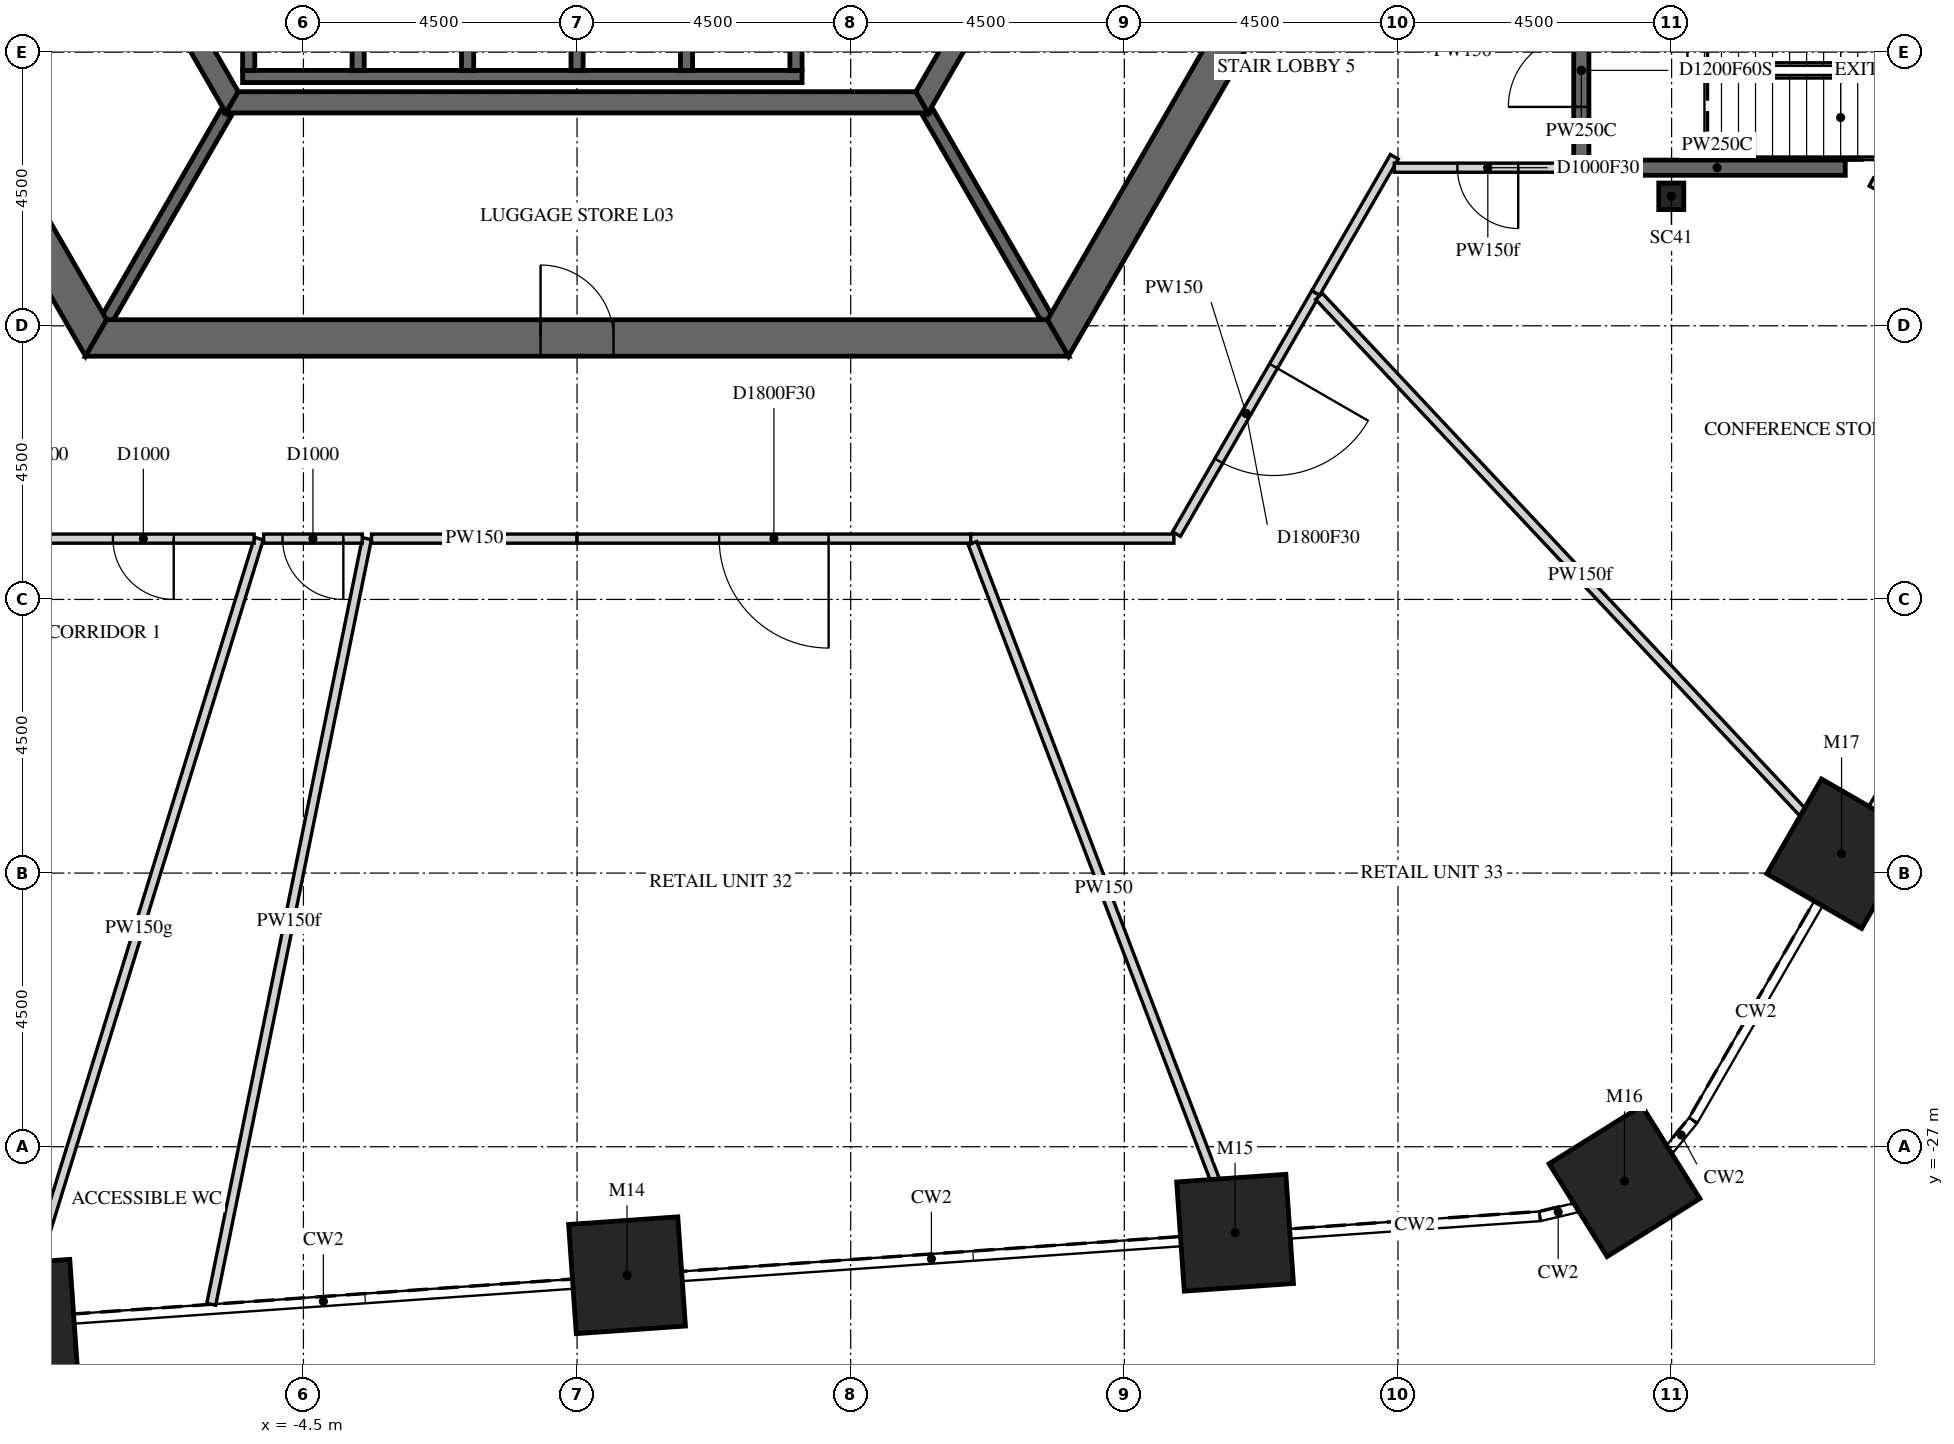
"""IFC4 building model, lengths in metres.
Left out: names, types, materials, properties, quantities, classifications, styles, units other than length and angle.
Written with IfcOpenShell. Run it as: python <this file> out.ifc"""

import sys

from ifc_helpers import new_model, si_unit, direction, frame, frame_2d, origin, origin_2d, place, context, subcontext, project, spatial, polyline, rectangle, i_section, outline, extrude, element, fill, save


model = new_model("IFC4")
c1 = context("Model", 3, precision=1e-05, world=origin(), true_north=direction((0.0, 1.0)))
c2 = subcontext(c1, "Body", "Model", "MODEL_VIEW")
j1 = project(units=[si_unit("LENGTHUNIT", "METRE"), si_unit("PLANEANGLEUNIT", "RADIAN")], contexts=[c1])
p1 = place(None, origin())
s1 = spatial("IfcSite", under=j1, at=p1, CompositionType="ELEMENT")
p2 = place(p1, origin())
s2 = spatial("IfcBuilding", under=s1, at=p2, CompositionType="ELEMENT")
p3 = place(p2, frame((0.0, 0.0, 20.5)))
s3 = spatial("IfcBuildingStorey", under=s2, at=p3, CompositionType="ELEMENT", Elevation=20.5)
for number, where, z_axis, x_axis in (
    (1, (-9.177, -29.813, -0.25), (0.0, 0.0, 1.0), (-0.998, -0.07, 0.0)),
    (2, (0.822, -29.114, -0.25), (0.0, 0.0, 1.0), (-0.998, -0.07, 0.0)),
    (3, (10.821, -28.414, -0.25), (0.0, 0.0, 1.0), (-0.998, -0.07, 0.0)),
    (4, (17.225, -27.566, -0.25), (0.0, 0.0, 1.0), (-0.848, -0.53, 0.0)),
    (5, (20.795, -22.182, -0.25), (0.0, 0.0, 1.0), (-0.5, -0.866, 0.0)),
):
    element("IfcColumn", number, at=place(p3, frame(where, z_axis=z_axis, x_axis=x_axis)), inside=s3, PredefinedType="COLUMN", context=c2, shape_type="SweptSolid", body=[
        extrude(rectangle(XDim=1.8, YDim=1.8, at=origin_2d()), origin(), (0.0, 0.0, 1.0), 5.5),
    ])
p4 = place(p3, frame((17.995, -11.37, -0.25), z_axis=(0.0, 0.0, 1.0), x_axis=(1.0, 0.0, 0.0)))
e6 = element("IfcColumn", 6, at=p4, inside=s3, PredefinedType="COLUMN", context=c2, shape_type="SweptSolid", body=[
    extrude(i_section(OverallWidth=0.412, OverallDepth=0.437, WebThickness=0.036, FlangeThickness=0.058, FilletRadius=0.015, at=origin_2d()), origin(), (0.0, 0.0, 1.0), 5.5),
])
p5 = place(p3, frame((-15.819, 0.0, -0.25), z_axis=(0.0, 0.0, 1.0), x_axis=(0.499999880136, -0.866025472988, 0.0)))
e7 = element("IfcWall", 7, at=p5, inside=s3, PredefinedType="SHEAR", context=c2, shape_type="SweptSolid", body=[
    extrude(outline(polyline([(-0.173, -0.3), (15.993, -0.3), (15.646, 0.3), (0.173, 0.3), (-0.173, -0.3)])), origin(), (0.0, 0.0, 1.0), 5.5),
])
p6 = place(p5, frame((6.981, 0.0, 0.25)))
e8 = element("IfcOpeningElement", 8, at=p6, cuts=e7, PredefinedType="OPENING", context=c2, shape_type="SweptSolid", body=[
    extrude(rectangle(XDim=1.8, YDim=2.4, at=frame_2d((0.9, 1.2))), frame((0.0, 0.31, 0.0), z_axis=(0.0, -1.0, 0.0), x_axis=(1.0, 0.0, 0.0)), (0.0, 0.0, 1.0), 0.62),
])
p7 = place(p3, frame((-7.91, -13.7, -0.25), z_axis=(0.0, 0.0, 1.0), x_axis=(1.0, 0.0, 0.0)))
e9 = element("IfcWall", 9, at=p7, inside=s3, PredefinedType="SHEAR", context=c2, shape_type="SweptSolid", body=[
    extrude(outline(polyline([(-0.173, -0.3), (15.993, -0.3), (15.646, 0.3), (0.173, 0.3), (-0.173, -0.3)])), origin(), (0.0, 0.0, 1.0), 5.5),
])
p8 = place(p7, frame((7.31, 0.0, 0.25)))
e10 = element("IfcOpeningElement", 10, at=p8, cuts=e9, PredefinedType="OPENING", context=c2, shape_type="SweptSolid", body=[
    extrude(rectangle(XDim=1.2, YDim=2.4, at=frame_2d((0.6, 1.2))), frame((0.0, 0.31, 0.0), z_axis=(0.0, -1.0, 0.0), x_axis=(1.0, 0.0, 0.0)), (0.0, 0.0, 1.0), 0.62),
])
p9 = place(p3, frame((7.91, -13.7, -0.25), z_axis=(0.0, 0.0, 1.0), x_axis=(0.499999880136, 0.866025472988, 0.0)))
e11 = element("IfcWall", 11, at=p9, inside=s3, PredefinedType="SHEAR", context=c2, shape_type="SweptSolid", body=[
    extrude(outline(polyline([(-0.173, -0.3), (15.993, -0.3), (15.646, 0.3), (0.173, 0.3), (-0.173, -0.3)])), origin(), (0.0, 0.0, 1.0), 5.5),
])
p10 = place(p9, frame((7.039, 0.0, 0.25)))
e12 = element("IfcOpeningElement", 12, at=p10, cuts=e11, PredefinedType="OPENING", context=c2, shape_type="SweptSolid", body=[
    extrude(rectangle(XDim=1.8, YDim=2.4, at=frame_2d((0.9, 1.2))), frame((0.0, 0.31, 0.0), z_axis=(0.0, -1.0, 0.0), x_axis=(1.0, 0.0, 0.0)), (0.0, 0.0, 1.0), 0.62),
])
p11 = place(p3, frame((-11.345, 0.0, -0.25), z_axis=(0.0, 0.0, 1.0), x_axis=(0.499995046907, -0.866028263435, 0.0)))
e13 = element("IfcWall", 13, at=p11, inside=s3, PredefinedType="SHEAR", context=c2, shape_type="SweptSolid", body=[
    extrude(outline(polyline([(-0.101, -0.175), (11.446, -0.175), (11.244, 0.175), (0.101, 0.175), (-0.101, -0.175)])), origin(), (0.0, 0.0, 1.0), 5.5),
])
p12 = place(p11, frame((4.744, 0.0, 0.25)))
e14 = element("IfcOpeningElement", 14, at=p12, cuts=e13, PredefinedType="OPENING", context=c2, shape_type="SweptSolid", body=[
    extrude(rectangle(XDim=1.8, YDim=2.4, at=frame_2d((0.9, 1.2))), frame((0.0, 0.185, 0.0), z_axis=(0.0, -1.0, 0.0), x_axis=(1.0, 0.0, 0.0)), (0.0, 0.0, 1.0), 0.37),
])
p13 = place(p3, frame((-5.673, -9.825, -0.25), z_axis=(0.0, 0.0, 1.0), x_axis=(1.0, 0.0, 0.0)))
e15 = element("IfcWall", 15, at=p13, inside=s3, PredefinedType="SHEAR", context=c2, shape_type="SweptSolid", body=[
    extrude(outline(polyline([(-0.101, -0.175), (11.446, -0.175), (11.244, 0.175), (0.101, 0.175), (-0.101, -0.175)])), origin(), (0.0, 0.0, 1.0), 5.5),
])
p14 = place(p3, frame((5.673, -9.825, -0.25), z_axis=(0.0, 0.0, 1.0), x_axis=(0.499995046907, 0.866028263435, 0.0)))
e16 = element("IfcWall", 16, at=p14, inside=s3, PredefinedType="SHEAR", context=c2, shape_type="SweptSolid", body=[
    extrude(outline(polyline([(-0.101, -0.175), (11.446, -0.175), (11.244, 0.175), (0.101, 0.175), (-0.101, -0.175)])), origin(), (0.0, 0.0, 1.0), 5.5),
])
p15 = place(p14, frame((4.801, 0.0, 0.25)))
e17 = element("IfcOpeningElement", 17, at=p15, cuts=e16, PredefinedType="OPENING", context=c2, shape_type="SweptSolid", body=[
    extrude(rectangle(XDim=1.8, YDim=2.4, at=frame_2d((0.9, 1.2))), frame((0.0, 0.185, 0.0), z_axis=(0.0, -1.0, 0.0), x_axis=(1.0, 0.0, 0.0)), (0.0, 0.0, 1.0), 0.37),
])
p16 = place(p3, frame((-5.5, -9.4, -0.25), z_axis=(0.0, 0.0, 1.0), x_axis=(1.0, 0.0, 0.0)))
e18 = element("IfcWall", 18, at=p16, inside=s3, PredefinedType="SHEAR", context=c2, shape_type="SweptSolid", body=[
    extrude(rectangle(XDim=9.2, YDim=0.2, at=frame_2d((4.6, 0.0))), origin(), (0.0, 0.0, 1.0), 5.5),
])
for number, where, z_axis, x_axis in (
    (19, (-5.4, -9.3, -0.25), (0.0, 0.0, 1.0), (0.0, 1.0, 0.0)),
    (20, (-3.6, -9.3, -0.25), (0.0, 0.0, 1.0), (0.0, 1.0, 0.0)),
    (21, (-1.8, -9.3, -0.25), (0.0, 0.0, 1.0), (0.0, 1.0, 0.0)),
    (22, (0.0, -9.3, -0.25), (0.0, 0.0, 1.0), (0.0, 1.0, 0.0)),
    (23, (1.8, -9.3, -0.25), (0.0, 0.0, 1.0), (0.0, 1.0, 0.0)),
    (24, (3.6, -9.3, -0.25), (0.0, 0.0, 1.0), (0.0, 1.0, 0.0)),
):
    element("IfcWall", number, at=place(p3, frame(where, z_axis=z_axis, x_axis=x_axis)), inside=s3, PredefinedType="SHEAR", context=c2, shape_type="SweptSolid", body=[
        extrude(rectangle(XDim=2.9, YDim=0.2, at=frame_2d((1.45, 0.0))), origin(), (0.0, 0.0, 1.0), 5.5),
    ])
for number, where, z_axis, x_axis in (
    (25, (-5.773, -10.0, -0.25), (0.0, 0.0, 1.0), (-0.5, -0.866, 0.0)),
    (26, (5.773, -10.0, -0.25), (0.0, 0.0, 1.0), (0.5, -0.866, 0.0)),
):
    element("IfcWall", number, at=place(p3, frame(where, z_axis=z_axis, x_axis=x_axis)), inside=s3, PredefinedType="SHEAR", context=c2, shape_type="SweptSolid", body=[
        extrude(rectangle(XDim=3.926, YDim=0.2, at=frame_2d((1.963, 0.0))), origin(), (0.0, 0.0, 1.0), 5.5),
    ])
p17 = place(p3, frame((-9.177, -29.813, 0.0), z_axis=(0.0, 0.0, 1.0), x_axis=(0.29419717946, 0.955744746048, 0.0)))
e27 = element("IfcWall", 27, at=p17, inside=s3, PredefinedType="PARTITIONING", context=c2, shape_type="SweptSolid", body=[
    extrude(rectangle(XDim=13.406, YDim=0.15, at=frame_2d((6.703, 0.0))), origin(), (0.0, 0.0, 1.0), 4.488),
])
p18 = place(p3, frame((-5.312, -17.0, 0.0), z_axis=(0.0, 0.0, 1.0), x_axis=(-1.0, 0.0, 0.0)))
e28 = element("IfcWall", 28, at=p18, inside=s3, PredefinedType="PARTITIONING", context=c2, shape_type="SweptSolid", body=[
    extrude(rectangle(XDim=3.643, YDim=0.15, at=frame_2d((1.821, 0.0))), origin(), (0.0, 0.0, 1.0), 5.25),
])
p19 = place(p18, frame((1.321, 0.0, 0.0)))
e29 = element("IfcOpeningElement", 29, at=p19, cuts=e28, PredefinedType="OPENING", context=c2, shape_type="SweptSolid", body=[
    extrude(rectangle(XDim=1.0, YDim=2.1, at=frame_2d((0.5, 1.05))), frame((0.0, 0.085, 0.0), z_axis=(0.0, -1.0, 0.0), x_axis=(1.0, 0.0, 0.0)), (0.0, 0.0, 1.0), 0.17),
])
p20 = place(p3, frame((-6.016, -29.592, 0.0), z_axis=(0.0, 0.0, 1.0), x_axis=(0.199231841521, 0.979952383192, 0.0)))
e30 = element("IfcWall", 30, at=p20, inside=s3, PredefinedType="PARTITIONING", context=c2, shape_type="SweptSolid", body=[
    extrude(rectangle(XDim=12.85, YDim=0.15, at=frame_2d((6.425, 0.0))), origin(), (0.0, 0.0, 1.0), 4.496),
])
p21 = place(p3, frame((-3.532, -17.0, 0.0), z_axis=(0.0, 0.0, 1.0), x_axis=(-1.0, 0.0, 0.0)))
e31 = element("IfcWall", 31, at=p21, inside=s3, PredefinedType="PARTITIONING", context=c2, shape_type="SweptSolid", body=[
    extrude(rectangle(XDim=1.622, YDim=0.15, at=frame_2d((0.811, 0.0))), origin(), (0.0, 0.0, 1.0), 5.25),
])
p22 = place(p21, frame((0.311, 0.0, 0.0)))
e32 = element("IfcOpeningElement", 32, at=p22, cuts=e31, PredefinedType="OPENING", context=c2, shape_type="SweptSolid", body=[
    extrude(rectangle(XDim=1.0, YDim=2.1, at=frame_2d((0.5, 1.05))), frame((0.0, 0.085, 0.0), z_axis=(0.0, -1.0, 0.0), x_axis=(1.0, 0.0, 0.0)), (0.0, 0.0, 1.0), 0.17),
])
p23 = place(p3, frame((-3.379, -17.0, 0.0), z_axis=(0.0, 0.0, 1.0), x_axis=(1.0, 0.0, 0.0)))
e33 = element("IfcWall", 33, at=p23, inside=s3, PredefinedType="PARTITIONING", context=c2, shape_type="SweptSolid", body=[
    extrude(rectangle(XDim=3.379, YDim=0.15, at=frame_2d((1.69, 0.0))), origin(), (0.0, 0.0, 1.0), 5.25),
])
p24 = place(p3, frame((6.474, -17.0, 0.0), z_axis=(0.0, 0.0, 1.0), x_axis=(-1.0, 0.0, 0.0)))
e34 = element("IfcWall", 34, at=p24, inside=s3, PredefinedType="PARTITIONING", context=c2, shape_type="SweptSolid", body=[
    extrude(rectangle(XDim=6.474, YDim=0.15, at=frame_2d((3.237, 0.0))), origin(), (0.0, 0.0, 1.0), 5.25),
])
p25 = place(p24, frame((2.337, 0.0, 0.0)))
e35 = element("IfcOpeningElement", 35, at=p25, cuts=e34, PredefinedType="OPENING", context=c2, shape_type="SweptSolid", body=[
    extrude(rectangle(XDim=1.8, YDim=2.1, at=frame_2d((0.9, 1.05))), frame((0.0, 0.085, 0.0), z_axis=(0.0, -1.0, 0.0), x_axis=(1.0, 0.0, 0.0)), (0.0, 0.0, 1.0), 0.17),
])
p26 = place(p3, frame((6.474, -17.0, 0.0), z_axis=(0.0, 0.0, 1.0), x_axis=(1.0, 0.0, 0.0)))
e36 = element("IfcWall", 36, at=p26, inside=s3, PredefinedType="PARTITIONING", context=c2, shape_type="SweptSolid", body=[
    extrude(rectangle(XDim=3.341, YDim=0.15, at=frame_2d((1.67, 0.0))), origin(), (0.0, 0.0, 1.0), 5.25),
])
p27 = place(p3, frame((12.148, -12.959, 0.0), z_axis=(0.0, 0.0, 1.0), x_axis=(-0.499957811549, -0.866049759928, 0.0)))
e37 = element("IfcWall", 37, at=p27, inside=s3, PredefinedType="PARTITIONING", context=c2, shape_type="SweptSolid", body=[
    extrude(rectangle(XDim=4.58, YDim=0.15, at=frame_2d((2.29, 0.0))), origin(), (0.0, 0.0, 1.0), 5.25),
])
p28 = place(p27, frame((1.39, 0.0, 0.0)))
e38 = element("IfcOpeningElement", 38, at=p28, cuts=e37, PredefinedType="OPENING", context=c2, shape_type="SweptSolid", body=[
    extrude(rectangle(XDim=1.8, YDim=2.1, at=frame_2d((0.9, 1.05))), frame((0.0, 0.085, 0.0), z_axis=(0.0, -1.0, 0.0), x_axis=(1.0, 0.0, 0.0)), (0.0, 0.0, 1.0), 0.17),
])
p29 = place(p3, frame((10.821, -28.414, 0.0), z_axis=(0.0, 0.0, 1.0), x_axis=(-0.355901613379, 0.934523430201, 0.0)))
e39 = element("IfcWall", 39, at=p29, inside=s3, PredefinedType="PARTITIONING", context=c2, shape_type="SweptSolid", body=[
    extrude(rectangle(XDim=12.134, YDim=0.15, at=frame_2d((6.067, 0.0))), origin(), (0.0, 0.0, 1.0), 5.25),
])
p30 = place(p3, frame((12.148, -12.959, 0.0), z_axis=(0.0, 0.0, 1.0), x_axis=(0.499959617396, 0.866048717436, 0.0)))
e40 = element("IfcWall", 40, at=p30, inside=s3, PredefinedType="PARTITIONING", context=c2, shape_type="SweptSolid", body=[
    extrude(rectangle(XDim=2.584, YDim=0.15, at=frame_2d((1.292, 0.0))), origin(), (0.0, 0.0, 1.0), 5.25),
])
p31 = place(p3, frame((16.515, -10.9, 0.0), z_axis=(0.0, 0.0, 1.0), x_axis=(-1.0, 0.0, 0.0)))
e41 = element("IfcWall", 41, at=p31, inside=s3, PredefinedType="PARTITIONING", context=c2, shape_type="SweptSolid", body=[
    extrude(rectangle(XDim=3.075, YDim=0.15, at=frame_2d((1.538, 0.0))), origin(), (0.0, 0.0, 1.0), 4.496),
])
p32 = place(p31, frame((1.038, 0.0, 0.0)))
e42 = element("IfcOpeningElement", 42, at=p32, cuts=e41, PredefinedType="OPENING", context=c2, shape_type="SweptSolid", body=[
    extrude(rectangle(XDim=1.0, YDim=2.1, at=frame_2d((0.5, 1.05))), frame((0.0, 0.085, 0.0), z_axis=(0.0, -1.0, 0.0), x_axis=(1.0, 0.0, 0.0)), (0.0, 0.0, 1.0), 0.17),
])
p33 = place(p3, frame((16.515, -10.825, 0.0), z_axis=(0.0, 0.0, 1.0), x_axis=(0.0, 1.0, 0.0)))
e43 = element("IfcWall", 43, at=p33, inside=s3, PredefinedType="PARTITIONING", context=c2, shape_type="SweptSolid", body=[
    extrude(rectangle(XDim=3.05, YDim=0.25, at=frame_2d((1.525, 0.0))), origin(), (0.0, 0.0, 1.0), 5.25),
])
p34 = place(p33, frame((0.925, 0.0, 0.0)))
e44 = element("IfcOpeningElement", 44, at=p34, cuts=e43, PredefinedType="OPENING", context=c2, shape_type="SweptSolid", body=[
    extrude(rectangle(XDim=1.2, YDim=2.1, at=frame_2d((0.6, 1.05))), frame((0.0, 0.135, 0.0), z_axis=(0.0, -1.0, 0.0), x_axis=(1.0, 0.0, 0.0)), (0.0, 0.0, 1.0), 0.27),
])
p35 = place(p3, frame((20.795, -22.182, 0.0), z_axis=(0.0, 0.0, 1.0), x_axis=(-0.683955995382, 0.729523266511, 0.0)))
e45 = element("IfcWall", 45, at=p35, inside=s3, PredefinedType="PARTITIONING", context=c2, shape_type="SweptSolid", body=[
    extrude(rectangle(XDim=12.564, YDim=0.15, at=frame_2d((6.282, 0.0))), origin(), (0.0, 0.0, 1.0), 4.496),
])
p36 = place(p3, frame((20.856, -10.9, 0.0), z_axis=(0.0, 0.0, 1.0), x_axis=(-1.0, 0.0, 0.0)))
e46 = element("IfcWall", 46, at=p36, inside=s3, PredefinedType="PARTITIONING", context=c2, shape_type="SweptSolid", body=[
    extrude(rectangle(XDim=4.216, YDim=0.25, at=frame_2d((2.108, 0.0))), origin(), (0.0, 0.0, 1.0), 5.25),
])
p37 = place(p3, frame((25.807, -13.501, 0.0), z_axis=(0.0, 0.0, 1.0), x_axis=(-0.886088844059, 0.463515437104, 0.0)))
e47 = element("IfcWall", 47, at=p37, inside=s3, PredefinedType="PARTITIONING", context=c2, shape_type="SweptSolid", body=[
    extrude(rectangle(XDim=5.104, YDim=0.15, at=frame_2d((2.552, 0.0))), origin(), (0.0, 0.0, 1.0), 4.323),
])
p38 = place(p8, origin())
e48 = element("IfcDoor", 48, at=p38, inside=s3, OperationType="SINGLE_SWING_LEFT", PredefinedType="DOOR", context=c2, shape_type="SweptSolid", body=[
    extrude(rectangle(XDim=1.2, YDim=2.4, at=frame_2d((0.6, 1.2))), frame((0.0, 0.025, 0.0), z_axis=(0.0, -1.0, 0.0), x_axis=(1.0, 0.0, 0.0)), (0.0, 0.0, 1.0), 0.05),
])
fill(e10, e48)
p39 = place(p19, origin())
e49 = element("IfcDoor", 49, at=p39, inside=s3, OperationType="SINGLE_SWING_LEFT", PredefinedType="DOOR", context=c2, shape_type="SweptSolid", body=[
    extrude(rectangle(XDim=1.0, YDim=2.1, at=frame_2d((0.5, 1.05))), frame((0.0, 0.025, 0.0), z_axis=(0.0, -1.0, 0.0), x_axis=(1.0, 0.0, 0.0)), (0.0, 0.0, 1.0), 0.05),
])
fill(e29, e49)
p40 = place(p22, origin())
e50 = element("IfcDoor", 50, at=p40, inside=s3, OperationType="SINGLE_SWING_RIGHT", PredefinedType="DOOR", context=c2, shape_type="SweptSolid", body=[
    extrude(rectangle(XDim=1.0, YDim=2.1, at=frame_2d((0.5, 1.05))), frame((0.0, 0.025, 0.0), z_axis=(0.0, -1.0, 0.0), x_axis=(1.0, 0.0, 0.0)), (0.0, 0.0, 1.0), 0.05),
])
fill(e32, e50)
p41 = place(p25, origin())
e51 = element("IfcDoor", 51, at=p41, inside=s3, OperationType="DOUBLE_DOOR_SINGLE_SWING", PredefinedType="DOOR", context=c2, shape_type="SweptSolid", body=[
    extrude(rectangle(XDim=1.8, YDim=2.1, at=frame_2d((0.9, 1.05))), frame((0.0, 0.025, 0.0), z_axis=(0.0, -1.0, 0.0), x_axis=(1.0, 0.0, 0.0)), (0.0, 0.0, 1.0), 0.05),
])
fill(e35, e51)
p42 = place(p28, origin())
e52 = element("IfcDoor", 52, at=p42, inside=s3, OperationType="DOUBLE_DOOR_SINGLE_SWING", PredefinedType="DOOR", context=c2, shape_type="SweptSolid", body=[
    extrude(rectangle(XDim=1.8, YDim=2.1, at=frame_2d((0.9, 1.05))), frame((0.0, 0.025, 0.0), z_axis=(0.0, -1.0, 0.0), x_axis=(1.0, 0.0, 0.0)), (0.0, 0.0, 1.0), 0.05),
])
fill(e38, e52)
p43 = place(p32, origin())
e53 = element("IfcDoor", 53, at=p43, inside=s3, OperationType="SINGLE_SWING_LEFT", PredefinedType="DOOR", context=c2, shape_type="SweptSolid", body=[
    extrude(rectangle(XDim=1.0, YDim=2.1, at=frame_2d((0.5, 1.05))), frame((0.0, 0.025, 0.0), z_axis=(0.0, -1.0, 0.0), x_axis=(1.0, 0.0, 0.0)), (0.0, 0.0, 1.0), 0.05),
])
fill(e42, e53)
p44 = place(p34, origin())
e54 = element("IfcDoor", 54, at=p44, inside=s3, OperationType="SINGLE_SWING_RIGHT", PredefinedType="DOOR", context=c2, shape_type="SweptSolid", body=[
    extrude(rectangle(XDim=1.2, YDim=2.1, at=frame_2d((0.6, 1.05))), frame((0.0, 0.025, 0.0), z_axis=(0.0, -1.0, 0.0), x_axis=(1.0, 0.0, 0.0)), (0.0, 0.0, 1.0), 0.05),
])
fill(e44, e54)
save(model, sys.argv[1])
